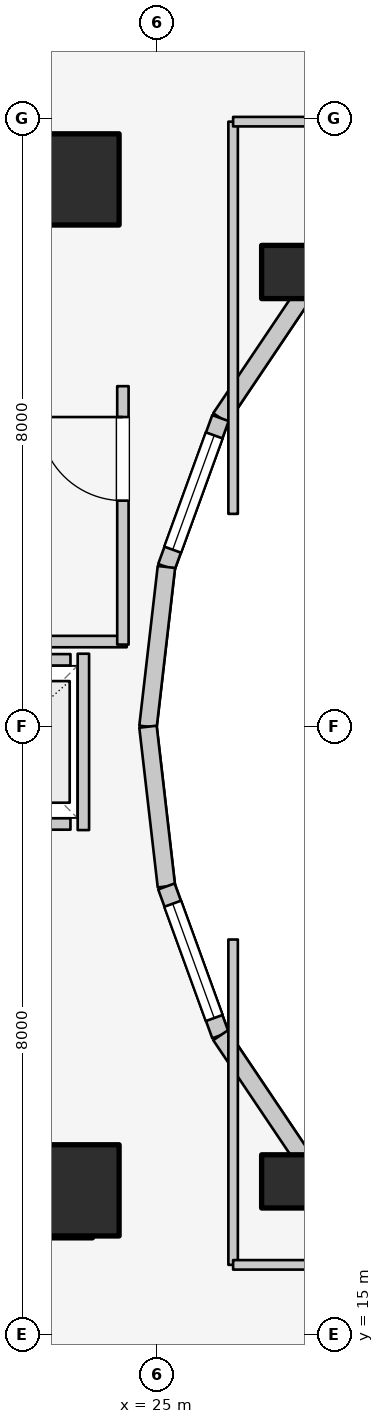
"""IFC4 building model, lengths in metres.
Left out: names, types, materials, properties, quantities, classifications, styles, units other than length and angle.
Written with IfcOpenShell. Run it as: python <this file> out.ifc"""

import sys

from ifc_helpers import new_model, si_unit, direction, frame, frame_2d, origin, origin_2d, place, context, subcontext, project, spatial, rectangle, extrude, element, fill, save


model = new_model("IFC4")
c1 = context("Model", 3, precision=1e-05, world=origin(), true_north=direction((0.0, 1.0)))
c2 = subcontext(c1, "Body", "Model", "MODEL_VIEW")
j1 = project(units=[si_unit("LENGTHUNIT", "METRE"), si_unit("PLANEANGLEUNIT", "RADIAN")], contexts=[c1])
p1 = place(None, origin())
s1 = spatial("IfcSite", under=j1, at=p1, CompositionType="ELEMENT")
p2 = place(p1, origin())
s2 = spatial("IfcBuilding", under=s1, at=p2, CompositionType="ELEMENT")
p3 = place(p2, frame((0.0, 0.0, 223.3)))
s3 = spatial("IfcBuildingStorey", under=s2, at=p3, CompositionType="ELEMENT", Elevation=223.3)
for number, where, z_axis, x_axis in (
    (1, (19.65, 16.55, 0.0), (0.0, 0.0, 1.0), (1.0, 0.0, 0.0)),
    (2, (19.65, 30.35, 0.0), (0.0, 0.0, 1.0), (1.0, 0.0, 0.0)),
):
    element("IfcWall", number, at=place(p3, frame(where, z_axis=z_axis, x_axis=x_axis)), inside=s3, PredefinedType="SHEAR", context=c2, shape_type="SweptSolid", body=[
        extrude(rectangle(XDim=4.5, YDim=0.55, at=frame_2d((2.25, 0.0))), origin(), (0.0, 0.0, 1.0), 3.1),
    ])
for number, where, z_axis, x_axis in (
    (3, (23.9, 16.9, 0.0), (0.0, 0.0, 1.0), (1.0, 0.0, 0.0)),
    (4, (23.9, 30.2, 0.0), (0.0, 0.0, 1.0), (1.0, 0.0, 0.0)),
):
    element("IfcColumn", number, at=place(p3, frame(where, z_axis=z_axis, x_axis=x_axis)), inside=s3, PredefinedType="COLUMN", context=c2, shape_type="SweptSolid", body=[
        extrude(rectangle(XDim=1.2, YDim=1.2, at=origin_2d()), origin(), (0.0, 0.0, 1.0), 3.1),
    ])
for number, where, z_axis, x_axis in (
    (5, (26.725, 28.982, 0.0), (0.0, 0.0, 1.0), (1.0, 0.0, 0.0)),
    (6, (26.725, 17.018, 0.0), (0.0, 0.0, 1.0), (1.0, 0.0, 0.0)),
):
    element("IfcColumn", number, at=place(p3, frame(where, z_axis=z_axis, x_axis=x_axis)), inside=s3, PredefinedType="COLUMN", context=c2, shape_type="SweptSolid", body=[
        extrude(rectangle(XDim=0.7, YDim=0.7, at=origin_2d()), origin(), (0.0, 0.0, 1.0), 3.1),
    ])
p4 = place(p3, frame((28.44, 30.032, 0.0), z_axis=(0.0, 0.0, 1.0), x_axis=(-0.752576694707, -0.658504607869, 0.0)))
e7 = element("IfcWall", 7, at=p4, inside=s3, PredefinedType="STANDARD", context=c2, shape_type="SweptSolid", body=[
    extrude(rectangle(XDim=1.959, YDim=0.23, at=frame_2d((0.98, 0.0))), origin(), (0.0, 0.0, 1.0), 2.16),
])
p5 = place(p3, frame((26.965, 28.742, 0.0), z_axis=(0.0, 0.0, 1.0), x_axis=(-0.558197800898, -0.829707909492, 0.0)))
e8 = element("IfcWall", 8, at=p5, inside=s3, PredefinedType="STANDARD", context=c2, shape_type="SweptSolid", body=[
    extrude(rectangle(XDim=2.027, YDim=0.23, at=frame_2d((1.013, 0.0))), origin(), (0.0, 0.0, 1.0), 2.16),
])
p6 = place(p3, frame((25.834, 27.06, 0.0), z_axis=(0.0, 0.0, 1.0), x_axis=(-0.341423187295, -0.93990968033, 0.0)))
e9 = element("IfcWall", 9, at=p6, inside=s3, PredefinedType="STANDARD", context=c2, shape_type="SweptSolid", body=[
    extrude(rectangle(XDim=2.084, YDim=0.23, at=frame_2d((1.042, 0.0))), origin(), (0.0, 0.0, 1.0), 2.84),
])
p7 = place(p6, frame((0.242, 0.0, 0.85)))
e10 = element("IfcOpeningElement", 10, at=p7, cuts=e9, PredefinedType="OPENING", context=c2, shape_type="SweptSolid", body=[
    extrude(rectangle(XDim=1.6, YDim=1.65, at=frame_2d((0.8, 0.825))), frame((0.0, 0.125, 0.0), z_axis=(0.0, -1.0, 0.0), x_axis=(1.0, 0.0, 0.0)), (0.0, 0.0, 1.0), 0.25),
])
for number, where, z_axis, x_axis in (
    (11, (25.123, 25.102, 0.0), (0.0, 0.0, 1.0), (-0.115, -0.993, 0.0)),
    (12, (24.88, 23.0, 0.0), (0.0, 0.0, 1.0), (0.115, -0.993, 0.0)),
):
    element("IfcWall", number, at=place(p3, frame(where, z_axis=z_axis, x_axis=x_axis)), inside=s3, PredefinedType="STANDARD", context=c2, shape_type="SweptSolid", body=[
        extrude(rectangle(XDim=2.115, YDim=0.23, at=frame_2d((1.058, 0.0))), origin(), (0.0, 0.0, 1.0), 2.84),
    ])
p8 = place(p3, frame((25.123, 20.898, 0.0), z_axis=(0.0, 0.0, 1.0), x_axis=(0.341423187295, -0.93990968033, 0.0)))
e13 = element("IfcWall", 13, at=p8, inside=s3, PredefinedType="STANDARD", context=c2, shape_type="SweptSolid", body=[
    extrude(rectangle(XDim=2.084, YDim=0.23, at=frame_2d((1.042, 0.0))), origin(), (0.0, 0.0, 1.0), 2.84),
])
p9 = place(p8, frame((0.242, 0.0, 0.85)))
e14 = element("IfcOpeningElement", 14, at=p9, cuts=e13, PredefinedType="OPENING", context=c2, shape_type="SweptSolid", body=[
    extrude(rectangle(XDim=1.6, YDim=1.65, at=frame_2d((0.8, 0.825))), frame((0.0, 0.125, 0.0), z_axis=(0.0, -1.0, 0.0), x_axis=(1.0, 0.0, 0.0)), (0.0, 0.0, 1.0), 0.25),
])
p10 = place(p3, frame((25.834, 18.94, 0.0), z_axis=(0.0, 0.0, 1.0), x_axis=(0.558197800898, -0.829707909492, 0.0)))
e15 = element("IfcWall", 15, at=p10, inside=s3, PredefinedType="STANDARD", context=c2, shape_type="SweptSolid", body=[
    extrude(rectangle(XDim=2.027, YDim=0.23, at=frame_2d((1.013, 0.0))), origin(), (0.0, 0.0, 1.0), 2.16),
])
p11 = place(p3, frame((26.965, 17.258, 0.0), z_axis=(0.0, 0.0, 1.0), x_axis=(0.752576694707, -0.658504607869, 0.0)))
e16 = element("IfcWall", 16, at=p11, inside=s3, PredefinedType="STANDARD", context=c2, shape_type="SweptSolid", body=[
    extrude(rectangle(XDim=1.959, YDim=0.23, at=frame_2d((0.98, 0.0))), origin(), (0.0, 0.0, 1.0), 2.16),
])
p12 = place(p3, frame((22.04, 21.72, 0.0), z_axis=(0.0, 0.0, 1.0), x_axis=(1.0, 0.0, 0.0)))
e17 = element("IfcWall", 17, at=p12, inside=s3, PredefinedType="SOLIDWALL", context=c2, shape_type="SweptSolid", body=[
    extrude(rectangle(XDim=1.82, YDim=0.15, at=frame_2d((0.91, 0.0))), origin(), (0.0, 0.0, 1.0), 2.12),
])
p13 = place(p12, frame((0.36, 0.0, 0.0)))
e18 = element("IfcOpeningElement", 18, at=p13, cuts=e17, PredefinedType="OPENING", context=c2, shape_type="SweptSolid", body=[
    extrude(rectangle(XDim=1.1, YDim=2.1, at=frame_2d((0.55, 1.05))), frame((0.0, 0.085, 0.0), z_axis=(0.0, -1.0, 0.0), x_axis=(1.0, 0.0, 0.0)), (0.0, 0.0, 1.0), 0.17),
])
p14 = place(p3, frame((22.04, 23.88, 0.0), z_axis=(0.0, 0.0, 1.0), x_axis=(1.0, 0.0, 0.0)))
e19 = element("IfcWall", 19, at=p14, inside=s3, PredefinedType="SOLIDWALL", context=c2, shape_type="SweptSolid", body=[
    extrude(rectangle(XDim=1.82, YDim=0.15, at=frame_2d((0.91, 0.0))), origin(), (0.0, 0.0, 1.0), 2.12),
])
p15 = place(p3, frame((24.03, 21.64, 0.0), z_axis=(0.0, 0.0, 1.0), x_axis=(0.0, 1.0, 0.0)))
e20 = element("IfcWall", 20, at=p15, inside=s3, PredefinedType="SOLIDWALL", context=c2, shape_type="SweptSolid", body=[
    extrude(rectangle(XDim=2.32, YDim=0.15, at=frame_2d((1.16, 0.0))), origin(), (0.0, 0.0, 1.0), 2.12),
])
p16 = place(p3, frame((19.52, 24.12, 0.0), z_axis=(0.0, 0.0, 1.0), x_axis=(1.0, 0.0, 0.0)))
e21 = element("IfcWall", 21, at=p16, inside=s3, PredefinedType="PARTITIONING", context=c2, shape_type="SweptSolid", body=[
    extrude(rectangle(XDim=5.08, YDim=0.15, at=frame_2d((2.54, 0.0))), origin(), (0.0, 0.0, 1.0), 2.12),
])
p17 = place(p3, frame((24.55, 24.08, 0.0), z_axis=(0.0, 0.0, 1.0), x_axis=(0.0, 1.0, 0.0)))
e22 = element("IfcWall", 22, at=p17, inside=s3, PredefinedType="PARTITIONING", context=c2, shape_type="SweptSolid", body=[
    extrude(rectangle(XDim=3.4, YDim=0.15, at=frame_2d((1.7, 0.0))), origin(), (0.0, 0.0, 1.0), 2.855),
])
p18 = place(p17, frame((1.894, 0.0, 0.0)))
e23 = element("IfcOpeningElement", 23, at=p18, cuts=e22, PredefinedType="OPENING", context=c2, shape_type="SweptSolid", body=[
    extrude(rectangle(XDim=1.1, YDim=2.1, at=frame_2d((0.55, 1.05))), frame((0.0, 0.085, 0.0), z_axis=(0.0, -1.0, 0.0), x_axis=(1.0, 0.0, 0.0)), (0.0, 0.0, 1.0), 0.17),
])
p19 = place(p3, frame((28.45, 30.015, 0.0), z_axis=(0.0, 0.0, 1.0), x_axis=(-0.523992004803, 0.851723182086, 0.0)))
e24 = element("IfcWall", 24, at=p19, inside=s3, PredefinedType="PARTITIONING", context=c2, shape_type="SweptSolid", body=[
    extrude(rectangle(XDim=3.101, YDim=0.125, at=frame_2d((1.551, 0.0))), origin(), (0.0, 0.0, 1.0), 2.376),
])
p20 = place(p3, frame((26.0, 25.8, 0.0), z_axis=(0.0, 0.0, 1.0), x_axis=(0.0, 1.0, 0.0)))
e25 = element("IfcWall", 25, at=p20, inside=s3, PredefinedType="PARTITIONING", context=c2, shape_type="SweptSolid", body=[
    extrude(rectangle(XDim=5.16, YDim=0.125, at=frame_2d((2.58, 0.0))), origin(), (0.0, 0.0, 1.0), 2.232),
])
p21 = place(p3, frame((26.0, 30.96, 0.0), z_axis=(0.0, 0.0, 1.0), x_axis=(1.0, 0.0, 0.0)))
e26 = element("IfcWall", 26, at=p21, inside=s3, PredefinedType="PARTITIONING", context=c2, shape_type="SweptSolid", body=[
    extrude(rectangle(XDim=2.6, YDim=0.125, at=frame_2d((1.3, 0.0))), origin(), (0.0, 0.0, 1.0), 2.376),
])
p22 = place(p3, frame((26.0, 15.92, 0.0), z_axis=(0.0, 0.0, 1.0), x_axis=(0.0, 1.0, 0.0)))
e27 = element("IfcWall", 27, at=p22, inside=s3, PredefinedType="PARTITIONING", context=c2, shape_type="SweptSolid", body=[
    extrude(rectangle(XDim=4.28, YDim=0.125, at=frame_2d((2.14, 0.0))), origin(), (0.0, 0.0, 1.0), 2.232),
])
p23 = place(p3, frame((26.0, 15.92, 0.0), z_axis=(0.0, 0.0, 1.0), x_axis=(1.0, 0.0, 0.0)))
e28 = element("IfcWall", 28, at=p23, inside=s3, PredefinedType="PARTITIONING", context=c2, shape_type="SweptSolid", body=[
    extrude(rectangle(XDim=2.6, YDim=0.125, at=frame_2d((1.3, 0.0))), origin(), (0.0, 0.0, 1.0), 2.232),
])
p24 = place(p7, origin())
e29 = element("IfcWindow", 29, at=p24, inside=s3, PartitioningType="SINGLE_PANEL", PredefinedType="WINDOW", context=c2, shape_type="SweptSolid", body=[
    extrude(rectangle(XDim=1.6, YDim=1.65, at=frame_2d((0.8, 0.825))), frame((0.0, 0.03, 0.0), z_axis=(0.0, -1.0, 0.0), x_axis=(1.0, 0.0, 0.0)), (0.0, 0.0, 1.0), 0.06),
])
fill(e10, e29)
p25 = place(p9, origin())
e30 = element("IfcWindow", 30, at=p25, inside=s3, PartitioningType="SINGLE_PANEL", PredefinedType="WINDOW", context=c2, shape_type="SweptSolid", body=[
    extrude(rectangle(XDim=1.6, YDim=1.65, at=frame_2d((0.8, 0.825))), frame((0.0, 0.03, 0.0), z_axis=(0.0, -1.0, 0.0), x_axis=(1.0, 0.0, 0.0)), (0.0, 0.0, 1.0), 0.06),
])
fill(e14, e30)
p26 = place(p18, origin())
e31 = element("IfcDoor", 31, at=p26, inside=s3, OperationType="SINGLE_SWING_RIGHT", PredefinedType="DOOR", context=c2, shape_type="SweptSolid", body=[
    extrude(rectangle(XDim=1.1, YDim=2.1, at=frame_2d((0.55, 1.05))), frame((0.0, 0.025, 0.0), z_axis=(0.0, -1.0, 0.0), x_axis=(1.0, 0.0, 0.0)), (0.0, 0.0, 1.0), 0.05),
])
fill(e23, e31)
save(model, sys.argv[1])
